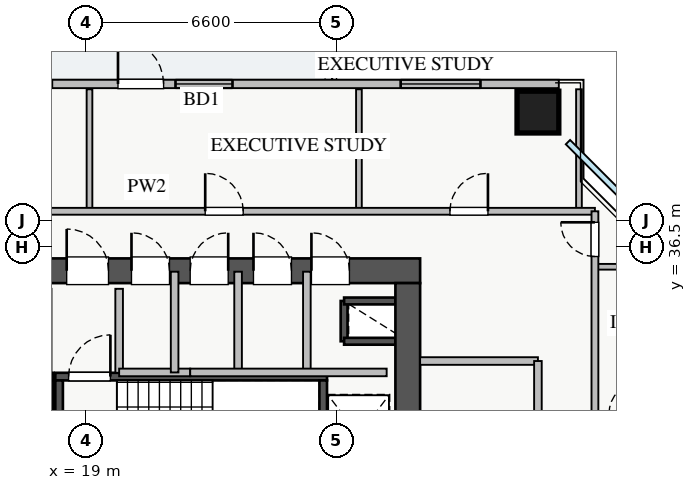
"""IFC4 building model, lengths in metres.
Left out: names, types, materials, properties, quantities, classifications, styles, units other than length and angle.
Written with IfcOpenShell. Run it as: python <this file> out.ifc"""

import sys

from ifc_helpers import new_model, si_unit, direction, frame, frame_2d, origin, origin_2d, place, context, subcontext, project, spatial, rectangle, extrude, source, transform, mapped, element, fill, save


model = new_model("IFC4")
c1 = context("Model", 3, precision=1e-05, world=origin(), true_north=direction((0.0, 1.0)))
c2 = subcontext(c1, "Body", "Model", "MODEL_VIEW")
j1 = project(units=[si_unit("LENGTHUNIT", "METRE"), si_unit("PLANEANGLEUNIT", "RADIAN")], contexts=[c1])
p1 = place(None, origin())
s1 = spatial("IfcSite", under=j1, at=p1, CompositionType="ELEMENT")
p2 = place(p1, origin())
s2 = spatial("IfcBuilding", under=s1, at=p2, CompositionType="ELEMENT")
p3 = place(p2, frame((0.0, 0.0, 103.5)))
s3 = spatial("IfcBuildingStorey", under=s2, at=p3, CompositionType="ELEMENT", Elevation=103.5)
p4 = place(p3, frame((25.8, 34.02, 0.0), z_axis=(0.0, 0.0, 1.0), x_axis=(0.0, 1.0, 0.0)))
e1 = element("IfcWall", 1, at=p4, inside=s3, PredefinedType="SHEAR", context=c2, shape_type="SweptSolid", body=[
    extrude(rectangle(XDim=1.06, YDim=0.18, at=frame_2d((0.53, 0.0))), origin(), (0.0, 0.0, 1.0), 3.07),
])
for number, where, z_axis, x_axis in (
    (2, (25.8, 35.08, 0.0), (0.0, 0.0, 1.0), (1.0, 0.0, 0.0)),
    (3, (25.8, 34.02, 0.0), (0.0, 0.0, 1.0), (1.0, 0.0, 0.0)),
):
    element("IfcWall", number, at=place(p3, frame(where, z_axis=z_axis, x_axis=x_axis)), inside=s3, PredefinedType="SHEAR", context=c2, shape_type="SweptSolid", body=[
        extrude(rectangle(XDim=1.35, YDim=0.18, at=frame_2d((0.675, 0.0))), origin(), (0.0, 0.0, 1.0), 3.07),
    ])
p5 = place(p3, frame((10.85, 33.09, 0.0), z_axis=(0.0, 0.0, 1.0), x_axis=(1.0, 0.0, 0.0)))
e4 = element("IfcWall", 4, at=p5, inside=s3, PredefinedType="SHEAR", context=c2, shape_type="SweptSolid", body=[
    extrude(rectangle(XDim=7.3, YDim=0.2, at=frame_2d((3.65, 0.0))), origin(), (0.0, 0.0, 1.0), 3.25),
])
p6 = place(p5, frame((0.35, 0.0, 0.0)))
e5 = element("IfcOpeningElement", 5, at=p6, cuts=e4, PredefinedType="OPENING", context=c2, shape_type="SweptSolid", body=[
    extrude(rectangle(XDim=1.1, YDim=2.05, at=frame_2d((0.55, 1.025))), frame((0.0, 0.11, 0.0), z_axis=(0.0, -1.0, 0.0), x_axis=(1.0, 0.0, 0.0)), (0.0, 0.0, 1.0), 0.22),
])
p7 = place(p3, frame((18.05, 30.05, 0.0), z_axis=(0.0, 0.0, 1.0), x_axis=(0.0, 1.0, 0.0)))
e6 = element("IfcWall", 6, at=p7, inside=s3, PredefinedType="SHEAR", context=c2, shape_type="SweptSolid", body=[
    extrude(rectangle(XDim=2.94, YDim=0.2, at=frame_2d((1.47, 0.0))), origin(), (0.0, 0.0, 1.0), 3.25),
])
p8 = place(p3, frame((18.2, 33.09, 0.0), z_axis=(0.0, 0.0, 1.0), x_axis=(1.0, 0.0, 0.0)))
e7 = element("IfcWall", 7, at=p8, inside=s3, PredefinedType="SHEAR", context=c2, shape_type="SweptSolid", body=[
    extrude(rectangle(XDim=7.15, YDim=0.2, at=frame_2d((3.575, 0.0))), origin(), (0.0, 0.0, 1.0), 3.25),
])
p9 = place(p8, frame((0.35, 0.0, 0.0)))
e8 = element("IfcOpeningElement", 8, at=p9, cuts=e7, PredefinedType="OPENING", context=c2, shape_type="SweptSolid", body=[
    extrude(rectangle(XDim=1.1, YDim=2.05, at=frame_2d((0.55, 1.025))), frame((0.0, 0.11, 0.0), z_axis=(0.0, -1.0, 0.0), x_axis=(1.0, 0.0, 0.0)), (0.0, 0.0, 1.0), 0.22),
])
for number, where, z_axis, x_axis in (
    (9, (18.3, 30.05, 0.0), (0.0, 0.0, 1.0), (0.0, 1.0, 0.0)),
    (10, (25.25, 30.05, 0.0), (0.0, 0.0, 1.0), (0.0, 1.0, 0.0)),
):
    element("IfcWall", number, at=place(p3, frame(where, z_axis=z_axis, x_axis=x_axis)), inside=s3, PredefinedType="SHEAR", context=c2, shape_type="SweptSolid", body=[
        extrude(rectangle(XDim=2.94, YDim=0.2, at=frame_2d((1.47, 0.0))), origin(), (0.0, 0.0, 1.0), 3.25),
    ])
p10 = place(p3, frame((10.2, 35.875, 0.0), z_axis=(0.0, 0.0, 1.0), x_axis=(1.0, 0.0, 0.0)))
e11 = element("IfcWall", 11, at=p10, inside=s3, PredefinedType="SHEAR", context=c2, shape_type="SweptSolid", body=[
    extrude(rectangle(XDim=17.6, YDim=0.65, at=frame_2d((8.8, 0.0))), origin(), (0.0, 0.0, 1.0), 3.25),
])
p11 = place(p10, frame((1.15, 0.0, 0.0)))
e12 = element("IfcOpeningElement", 12, at=p11, cuts=e11, PredefinedType="OPENING", context=c2, shape_type="SweptSolid", body=[
    extrude(rectangle(XDim=1.1, YDim=2.05, at=frame_2d((0.55, 1.025))), frame((0.0, 0.335, 0.0), z_axis=(0.0, -1.0, 0.0), x_axis=(1.0, 0.0, 0.0)), (0.0, 0.0, 1.0), 0.67),
])
p12 = place(p10, frame((8.3, 0.0, 0.0)))
e13 = element("IfcOpeningElement", 13, at=p12, cuts=e11, PredefinedType="OPENING", context=c2, shape_type="SweptSolid", body=[
    extrude(rectangle(XDim=1.1, YDim=2.05, at=frame_2d((0.55, 1.025))), frame((0.0, 0.335, 0.0), z_axis=(0.0, -1.0, 0.0), x_axis=(1.0, 0.0, 0.0)), (0.0, 0.0, 1.0), 0.67),
])
p13 = place(p10, frame((4.9, 0.0, 0.0)))
e14 = element("IfcOpeningElement", 14, at=p13, cuts=e11, PredefinedType="OPENING", context=c2, shape_type="SweptSolid", body=[
    extrude(rectangle(XDim=1.1, YDim=2.05, at=frame_2d((0.55, 1.025))), frame((0.0, 0.335, 0.0), z_axis=(0.0, -1.0, 0.0), x_axis=(1.0, 0.0, 0.0)), (0.0, 0.0, 1.0), 0.67),
])
p14 = place(p10, frame((14.74, 0.0, 0.0)))
e15 = element("IfcOpeningElement", 15, at=p14, cuts=e11, PredefinedType="OPENING", context=c2, shape_type="SweptSolid", body=[
    extrude(rectangle(XDim=1.0, YDim=2.05, at=frame_2d((0.5, 1.025))), frame((0.0, 0.335, 0.0), z_axis=(0.0, -1.0, 0.0), x_axis=(1.0, 0.0, 0.0)), (0.0, 0.0, 1.0), 0.67),
])
p15 = place(p10, frame((10.005, 0.0, 0.0)))
e16 = element("IfcOpeningElement", 16, at=p15, cuts=e11, PredefinedType="OPENING", context=c2, shape_type="SweptSolid", body=[
    extrude(rectangle(XDim=1.0, YDim=2.05, at=frame_2d((0.5, 1.025))), frame((0.0, 0.335, 0.0), z_axis=(0.0, -1.0, 0.0), x_axis=(1.0, 0.0, 0.0)), (0.0, 0.0, 1.0), 0.67),
])
p16 = place(p10, frame((11.55, 0.0, 0.0)))
e17 = element("IfcOpeningElement", 17, at=p16, cuts=e11, PredefinedType="OPENING", context=c2, shape_type="SweptSolid", body=[
    extrude(rectangle(XDim=1.0, YDim=2.05, at=frame_2d((0.5, 1.025))), frame((0.0, 0.335, 0.0), z_axis=(0.0, -1.0, 0.0), x_axis=(1.0, 0.0, 0.0)), (0.0, 0.0, 1.0), 0.67),
])
p17 = place(p10, frame((13.215, 0.0, 0.0)))
e18 = element("IfcOpeningElement", 18, at=p17, cuts=e11, PredefinedType="OPENING", context=c2, shape_type="SweptSolid", body=[
    extrude(rectangle(XDim=1.0, YDim=2.05, at=frame_2d((0.5, 1.025))), frame((0.0, 0.335, 0.0), z_axis=(0.0, -1.0, 0.0), x_axis=(1.0, 0.0, 0.0)), (0.0, 0.0, 1.0), 0.67),
])
p18 = place(p3, frame((27.475, 29.65, 0.0), z_axis=(0.0, 0.0, 1.0), x_axis=(0.0, 1.0, 0.0)))
e19 = element("IfcWall", 19, at=p18, inside=s3, PredefinedType="SHEAR", context=c2, shape_type="SweptSolid", body=[
    extrude(rectangle(XDim=5.9, YDim=0.65, at=frame_2d((2.95, 0.0))), origin(), (0.0, 0.0, 1.0), 3.25),
])
p19 = place(p18, frame((1.1, 0.0, 0.0)))
e20 = element("IfcOpeningElement", 20, at=p19, cuts=e19, PredefinedType="OPENING", context=c2, shape_type="SweptSolid", body=[
    extrude(rectangle(XDim=1.3, YDim=2.05, at=frame_2d((0.65, 1.025))), frame((0.0, 0.335, 0.0), z_axis=(0.0, -1.0, 0.0), x_axis=(1.0, 0.0, 0.0)), (0.0, 0.0, 1.0), 0.67),
])
m1 = source(origin(), c2, "Body", "SweptSolid", [
    extrude(rectangle(XDim=1.1, YDim=1.1, at=origin_2d()), origin(), (0.0, 0.0, 1.0), 3.25),
])
p20 = place(p3, frame((30.9, 40.05, 0.0), z_axis=(0.0, 0.0, 1.0), x_axis=(1.0, 0.0, 0.0)))
e21 = element("IfcColumn", 21, at=p20, inside=s3, PredefinedType="COLUMN", context=c2, shape_type="MappedRepresentation", body=[
    mapped(m1, transform((0.0, 0.0, 0.0), x_axis=(1.0, 0.0, 0.0), y_axis=(0.0, 1.0, 0.0), z_axis=(0.0, 0.0, 1.0), scale=1.0)),
])
p21 = place(p3, frame((6.55, 40.79, 0.0), z_axis=(0.0, 0.0, 1.0), x_axis=(1.0, 0.0, 0.0)))
e22 = element("IfcWall", 22, at=p21, inside=s3, PredefinedType="STANDARD", context=c2, shape_type="SweptSolid", body=[
    extrude(rectangle(XDim=24.9, YDim=0.22, at=frame_2d((12.45, 0.0))), origin(), (0.0, 0.0, 1.0), 2.61),
])
p22 = place(p21, frame((13.3, 0.0, 0.0)))
e23 = element("IfcOpeningElement", 23, at=p22, cuts=e22, PredefinedType="OPENING", context=c2, shape_type="SweptSolid", body=[
    extrude(rectangle(XDim=1.2, YDim=2.1, at=frame_2d((0.6, 1.05))), frame((0.0, 0.12, 0.0), z_axis=(0.0, -1.0, 0.0), x_axis=(1.0, 0.0, 0.0)), (0.0, 0.0, 1.0), 0.24),
])
p23 = place(p21, frame((0.393, 0.0, 0.9)))
e24 = element("IfcOpeningElement", 24, at=p23, cuts=e22, PredefinedType="OPENING", context=c2, shape_type="SweptSolid", body=[
    extrude(rectangle(XDim=1.5, YDim=1.5, at=frame_2d((0.75, 0.75))), frame((0.0, 0.12, 0.0), z_axis=(0.0, -1.0, 0.0), x_axis=(1.0, 0.0, 0.0)), (0.0, 0.0, 1.0), 0.24),
])
p24 = place(p21, frame((9.76, 0.0, 0.9)))
e25 = element("IfcOpeningElement", 25, at=p24, cuts=e22, PredefinedType="OPENING", context=c2, shape_type="SweptSolid", body=[
    extrude(rectangle(XDim=1.8, YDim=1.5, at=frame_2d((0.9, 0.75))), frame((0.0, 0.12, 0.0), z_axis=(0.0, -1.0, 0.0), x_axis=(1.0, 0.0, 0.0)), (0.0, 0.0, 1.0), 0.24),
])
p25 = place(p21, frame((14.813, 0.0, 0.9)))
e26 = element("IfcOpeningElement", 26, at=p25, cuts=e22, PredefinedType="OPENING", context=c2, shape_type="SweptSolid", body=[
    extrude(rectangle(XDim=1.5, YDim=1.45, at=frame_2d((0.75, 0.725))), frame((0.0, 0.12, 0.0), z_axis=(0.0, -1.0, 0.0), x_axis=(1.0, 0.0, 0.0)), (0.0, 0.0, 1.0), 0.24),
])
p26 = place(p21, frame((20.738, 0.0, 0.9)))
e27 = element("IfcOpeningElement", 27, at=p26, cuts=e22, PredefinedType="OPENING", context=c2, shape_type="SweptSolid", body=[
    extrude(rectangle(XDim=2.1, YDim=1.48, at=frame_2d((1.05, 0.74))), frame((0.0, 0.12, 0.0), z_axis=(0.0, -1.0, 0.0), x_axis=(1.0, 0.0, 0.0)), (0.0, 0.0, 1.0), 0.24),
])
p27 = place(p21, frame((4.171, 0.0, 0.9)))
e28 = element("IfcOpeningElement", 28, at=p27, cuts=e22, PredefinedType="OPENING", context=c2, shape_type="SweptSolid", body=[
    extrude(rectangle(XDim=2.4, YDim=1.5, at=frame_2d((1.2, 0.75))), frame((0.0, 0.12, 0.0), z_axis=(0.0, -1.0, 0.0), x_axis=(1.0, 0.0, 0.0)), (0.0, 0.0, 1.0), 0.24),
])
p28 = place(p3, frame((27.8, 33.5, 0.0), z_axis=(0.0, 0.0, 1.0), x_axis=(1.0, 0.0, 0.0)))
e29 = element("IfcWall", 29, at=p28, inside=s3, PredefinedType="PARTITIONING", context=c2, shape_type="SweptSolid", body=[
    extrude(rectangle(XDim=3.1, YDim=0.2, at=frame_2d((1.55, 0.0))), origin(), (0.0, 0.0, 1.0), 3.07),
])
p29 = place(p3, frame((30.9, 29.6, 0.0), z_axis=(0.0, 0.0, 1.0), x_axis=(0.0, 1.0, 0.0)))
e30 = element("IfcWall", 30, at=p29, inside=s3, PredefinedType="PARTITIONING", context=c2, shape_type="SweptSolid", body=[
    extrude(rectangle(XDim=3.9, YDim=0.2, at=frame_2d((1.95, 0.0))), origin(), (0.0, 0.0, 1.0), 3.07),
])
p30 = place(p29, frame((1.4, 0.0, 0.0)))
e31 = element("IfcOpeningElement", 31, at=p30, cuts=e30, PredefinedType="OPENING", context=c2, shape_type="SweptSolid", body=[
    extrude(rectangle(XDim=1.1, YDim=2.05, at=frame_2d((0.55, 1.025))), frame((0.0, 0.11, 0.0), z_axis=(0.0, -1.0, 0.0), x_axis=(1.0, 0.0, 0.0)), (0.0, 0.0, 1.0), 0.22),
])
p31 = place(p3, frame((19.88, 33.19, 0.0), z_axis=(0.0, 0.0, 1.0), x_axis=(0.0, 1.0, 0.0)))
e32 = element("IfcWall", 32, at=p31, inside=s3, PredefinedType="PARTITIONING", context=c2, shape_type="SweptSolid", body=[
    extrude(rectangle(XDim=2.21, YDim=0.2, at=frame_2d((1.105, 0.0))), origin(), (0.0, 0.0, 1.0), 3.07),
])
p32 = place(p3, frame((24.82, 33.2, 0.0), z_axis=(0.0, 0.0, 1.0), x_axis=(0.0, 1.0, 0.0)))
e33 = element("IfcWall", 33, at=p32, inside=s3, PredefinedType="PARTITIONING", context=c2, shape_type="SweptSolid", body=[
    extrude(rectangle(XDim=2.65, YDim=0.2, at=frame_2d((1.325, 0.0))), origin(), (0.0, 0.0, 1.0), 3.07),
])
p33 = place(p3, frame((19.88, 33.2, 0.0), z_axis=(0.0, 0.0, 1.0), x_axis=(1.0, 0.0, 0.0)))
e34 = element("IfcWall", 34, at=p33, inside=s3, PredefinedType="PARTITIONING", context=c2, shape_type="SweptSolid", body=[
    extrude(rectangle(XDim=1.87, YDim=0.2, at=frame_2d((0.935, 0.0))), origin(), (0.0, 0.0, 1.0), 3.07),
])
for number, where, z_axis, x_axis in (
    (35, (21.34, 33.2, 0.0), (0.0, 0.0, 1.0), (0.0, 1.0, 0.0)),
    (36, (23.01, 33.2, 0.0), (0.0, 0.0, 1.0), (0.0, 1.0, 0.0)),
):
    element("IfcWall", number, at=place(p3, frame(where, z_axis=z_axis, x_axis=x_axis)), inside=s3, PredefinedType="PARTITIONING", context=c2, shape_type="SweptSolid", body=[
        extrude(rectangle(XDim=2.65, YDim=0.2, at=frame_2d((1.325, 0.0))), origin(), (0.0, 0.0, 1.0), 3.07),
    ])
p34 = place(p3, frame((21.75, 33.2, 0.0), z_axis=(0.0, 0.0, 1.0), x_axis=(1.0, 0.0, 0.0)))
e37 = element("IfcWall", 37, at=p34, inside=s3, PredefinedType="PARTITIONING", context=c2, shape_type="SweptSolid", body=[
    extrude(rectangle(XDim=5.17, YDim=0.2, at=frame_2d((2.585, 0.0))), origin(), (0.0, 0.0, 1.0), 3.07),
])
p35 = place(p3, frame((19.1, 37.44, 0.0), z_axis=(0.0, 0.0, 1.0), x_axis=(0.0, 1.0, 0.0)))
e38 = element("IfcWall", 38, at=p35, inside=s3, PredefinedType="PARTITIONING", context=c2, shape_type="SweptSolid", body=[
    extrude(rectangle(XDim=3.21, YDim=0.15, at=frame_2d((1.605, 0.0))), origin(), (0.0, 0.0, 1.0), 2.865),
])
for number, where, z_axis, x_axis in (
    (39, (26.19, 37.44, 0.0), (0.0, 0.0, 1.0), (0.0, 1.0, 0.0)),
    (40, (31.98, 37.44, 0.0), (0.0, 0.0, 1.0), (0.0, 1.0, 0.0)),
):
    element("IfcWall", number, at=place(p3, frame(where, z_axis=z_axis, x_axis=x_axis)), inside=s3, PredefinedType="PARTITIONING", context=c2, shape_type="SweptSolid", body=[
        extrude(rectangle(XDim=3.21, YDim=0.15, at=frame_2d((1.605, 0.0))), origin(), (0.0, 0.0, 1.0), 3.07),
    ])
p36 = place(p3, frame((8.82, 37.44, 0.0), z_axis=(0.0, 0.0, 1.0), x_axis=(1.0, 0.0, 0.0)))
e41 = element("IfcWall", 41, at=p36, inside=s3, PredefinedType="PARTITIONING", context=c2, shape_type="SweptSolid", body=[
    extrude(rectangle(XDim=23.58, YDim=0.18, at=frame_2d((11.79, 0.0))), origin(), (0.0, 0.0, 1.0), 3.07),
])
p37 = place(p36, frame((2.75, 0.0, 0.0)))
e42 = element("IfcOpeningElement", 42, at=p37, cuts=e41, PredefinedType="OPENING", context=c2, shape_type="SweptSolid", body=[
    extrude(rectangle(XDim=1.0, YDim=2.05, at=frame_2d((0.5, 1.025))), frame((0.0, 0.1, 0.0), z_axis=(0.0, -1.0, 0.0), x_axis=(1.0, 0.0, 0.0)), (0.0, 0.0, 1.0), 0.2),
])
p38 = place(p36, frame((7.89, 0.0, 0.0)))
e43 = element("IfcOpeningElement", 43, at=p38, cuts=e41, PredefinedType="OPENING", context=c2, shape_type="SweptSolid", body=[
    extrude(rectangle(XDim=1.0, YDim=2.05, at=frame_2d((0.5, 1.025))), frame((0.0, 0.1, 0.0), z_axis=(0.0, -1.0, 0.0), x_axis=(1.0, 0.0, 0.0)), (0.0, 0.0, 1.0), 0.2),
])
p39 = place(p36, frame((13.325, 0.0, 0.0)))
e44 = element("IfcOpeningElement", 44, at=p39, cuts=e41, PredefinedType="OPENING", context=c2, shape_type="SweptSolid", body=[
    extrude(rectangle(XDim=1.0, YDim=2.05, at=frame_2d((0.5, 1.025))), frame((0.0, 0.1, 0.0), z_axis=(0.0, -1.0, 0.0), x_axis=(1.0, 0.0, 0.0)), (0.0, 0.0, 1.0), 0.2),
])
p40 = place(p36, frame((19.765, 0.0, 0.0)))
e45 = element("IfcOpeningElement", 45, at=p40, cuts=e41, PredefinedType="OPENING", context=c2, shape_type="SweptSolid", body=[
    extrude(rectangle(XDim=1.0, YDim=2.05, at=frame_2d((0.5, 1.025))), frame((0.0, 0.1, 0.0), z_axis=(0.0, -1.0, 0.0), x_axis=(1.0, 0.0, 0.0)), (0.0, 0.0, 1.0), 0.2),
])
p41 = place(p3, frame((32.4, 35.98, 0.0), z_axis=(0.0, 0.0, 1.0), x_axis=(1.0, 0.0, 0.0)))
e46 = element("IfcWall", 46, at=p41, inside=s3, PredefinedType="PARTITIONING", context=c2, shape_type="SweptSolid", body=[
    extrude(rectangle(XDim=4.25, YDim=0.15, at=frame_2d((2.125, 0.0))), origin(), (0.0, 0.0, 1.0), 3.07),
])
p42 = place(p3, frame((32.4, 8.31, 0.0), z_axis=(0.0, 0.0, 1.0), x_axis=(0.0, 1.0, 0.0)))
e47 = element("IfcWall", 47, at=p42, inside=s3, PredefinedType="PARTITIONING", context=c2, shape_type="SweptSolid", body=[
    extrude(rectangle(XDim=29.13, YDim=0.18, at=frame_2d((14.565, 0.0))), origin(), (0.0, 0.0, 1.0), 3.07),
])
p43 = place(p42, frame((27.94, 0.0, 0.0)))
e48 = element("IfcOpeningElement", 48, at=p43, cuts=e47, PredefinedType="OPENING", context=c2, shape_type="SweptSolid", body=[
    extrude(rectangle(XDim=0.9, YDim=2.05, at=frame_2d((0.45, 1.025))), frame((0.0, 0.1, 0.0), z_axis=(0.0, -1.0, 0.0), x_axis=(1.0, 0.0, 0.0)), (0.0, 0.0, 1.0), 0.2),
])
p44 = place(p42, frame((0.415, 0.0, 0.0)))
e49 = element("IfcOpeningElement", 49, at=p44, cuts=e47, PredefinedType="OPENING", context=c2, shape_type="SweptSolid", body=[
    extrude(rectangle(XDim=0.9, YDim=2.05, at=frame_2d((0.45, 1.025))), frame((0.0, 0.1, 0.0), z_axis=(0.0, -1.0, 0.0), x_axis=(1.0, 0.0, 0.0)), (0.0, 0.0, 1.0), 0.2),
])
p45 = place(p42, frame((5.88, 0.0, 0.0)))
e50 = element("IfcOpeningElement", 50, at=p45, cuts=e47, PredefinedType="OPENING", context=c2, shape_type="SweptSolid", body=[
    extrude(rectangle(XDim=1.0, YDim=2.05, at=frame_2d((0.5, 1.025))), frame((0.0, 0.1, 0.0), z_axis=(0.0, -1.0, 0.0), x_axis=(1.0, 0.0, 0.0)), (0.0, 0.0, 1.0), 0.2),
])
p46 = place(p42, frame((12.23, 0.0, 0.0)))
e51 = element("IfcOpeningElement", 51, at=p46, cuts=e47, PredefinedType="OPENING", context=c2, shape_type="SweptSolid", body=[
    extrude(rectangle(XDim=1.0, YDim=2.05, at=frame_2d((0.5, 1.025))), frame((0.0, 0.1, 0.0), z_axis=(0.0, -1.0, 0.0), x_axis=(1.0, 0.0, 0.0)), (0.0, 0.0, 1.0), 0.2),
])
p47 = place(p42, frame((20.835, 0.0, 0.0)))
e52 = element("IfcOpeningElement", 52, at=p47, cuts=e47, PredefinedType="OPENING", context=c2, shape_type="SweptSolid", body=[
    extrude(rectangle(XDim=1.0, YDim=2.05, at=frame_2d((0.5, 1.025))), frame((0.0, 0.1, 0.0), z_axis=(0.0, -1.0, 0.0), x_axis=(1.0, 0.0, 0.0)), (0.0, 0.0, 1.0), 0.2),
])
m2 = source(origin(), c2, "Body", "SweptSolid", [
    extrude(rectangle(XDim=1.2, YDim=2.1, at=frame_2d((0.6, 1.05))), frame((0.0, 0.025, 0.0), z_axis=(0.0, -1.0, 0.0), x_axis=(1.0, 0.0, 0.0)), (0.0, 0.0, 1.0), 0.05),
])
p48 = place(p22, origin())
e53 = element("IfcDoor", 53, at=p48, inside=s3, OperationType="SINGLE_SWING_LEFT", PredefinedType="DOOR", context=c2, shape_type="MappedRepresentation", body=[
    mapped(m2, transform((0.0, 0.0, 0.0), x_axis=(1.0, 0.0, 0.0), y_axis=(0.0, 1.0, 0.0), z_axis=(0.0, 0.0, 1.0), scale=1.0)),
])
fill(e23, e53)
m3 = source(origin(), c2, "Body", "SweptSolid", [
    extrude(rectangle(XDim=1.5, YDim=1.45, at=frame_2d((0.75, 0.725))), frame((0.0, 0.03, 0.0), z_axis=(0.0, -1.0, 0.0), x_axis=(1.0, 0.0, 0.0)), (0.0, 0.0, 1.0), 0.06),
])
p49 = place(p25, origin())
e54 = element("IfcWindow", 54, at=p49, inside=s3, PartitioningType="DOUBLE_PANEL_VERTICAL", PredefinedType="WINDOW", context=c2, shape_type="MappedRepresentation", body=[
    mapped(m3, transform((0.0, 0.0, 0.0), x_axis=(1.0, 0.0, 0.0), y_axis=(0.0, 1.0, 0.0), z_axis=(0.0, 0.0, 1.0), scale=1.0)),
])
fill(e26, e54)
m4 = source(origin(), c2, "Body", "SweptSolid", [
    extrude(rectangle(XDim=2.1, YDim=1.48, at=frame_2d((1.05, 0.74))), frame((0.0, 0.03, 0.0), z_axis=(0.0, -1.0, 0.0), x_axis=(1.0, 0.0, 0.0)), (0.0, 0.0, 1.0), 0.06),
])
p50 = place(p26, origin())
e55 = element("IfcWindow", 55, at=p50, inside=s3, PartitioningType="TRIPLE_PANEL_VERTICAL", PredefinedType="WINDOW", context=c2, shape_type="MappedRepresentation", body=[
    mapped(m4, transform((0.0, 0.0, 0.0), x_axis=(1.0, 0.0, 0.0), y_axis=(0.0, 1.0, 0.0), z_axis=(0.0, 0.0, 1.0), scale=1.0)),
])
fill(e27, e55)
m5 = source(origin(), c2, "Body", "SweptSolid", [
    extrude(rectangle(XDim=1.1, YDim=2.05, at=frame_2d((0.55, 1.025))), frame((0.0, 0.025, 0.0), z_axis=(0.0, -1.0, 0.0), x_axis=(1.0, 0.0, 0.0)), (0.0, 0.0, 1.0), 0.05),
])
p51 = place(p12, origin())
e56 = element("IfcDoor", 56, at=p51, inside=s3, OperationType="SINGLE_SWING_LEFT", PredefinedType="DOOR", context=c2, shape_type="MappedRepresentation", body=[
    mapped(m5, transform((0.0, 0.0, 0.0), x_axis=(1.0, 0.0, 0.0), y_axis=(0.0, 1.0, 0.0), z_axis=(0.0, 0.0, 1.0), scale=1.0)),
])
fill(e13, e56)
p52 = place(p9, origin())
e57 = element("IfcDoor", 57, at=p52, inside=s3, OperationType="SINGLE_SWING_RIGHT", PredefinedType="DOOR", context=c2, shape_type="MappedRepresentation", body=[
    mapped(m5, transform((0.0, 0.0, 0.0), x_axis=(1.0, 0.0, 0.0), y_axis=(0.0, 1.0, 0.0), z_axis=(0.0, 0.0, 1.0), scale=1.0)),
])
fill(e8, e57)
m6 = source(origin(), c2, "Body", "SweptSolid", [
    extrude(rectangle(XDim=1.0, YDim=2.05, at=frame_2d((0.5, 1.025))), frame((0.0, 0.025, 0.0), z_axis=(0.0, -1.0, 0.0), x_axis=(1.0, 0.0, 0.0)), (0.0, 0.0, 1.0), 0.05),
])
p53 = place(p14, origin())
e58 = element("IfcDoor", 58, at=p53, inside=s3, OperationType="SINGLE_SWING_LEFT", PredefinedType="DOOR", context=c2, shape_type="MappedRepresentation", body=[
    mapped(m6, transform((0.0, 0.0, 0.0), x_axis=(1.0, 0.0, 0.0), y_axis=(0.0, 1.0, 0.0), z_axis=(0.0, 0.0, 1.0), scale=1.0)),
])
fill(e15, e58)
p54 = place(p15, origin())
e59 = element("IfcDoor", 59, at=p54, inside=s3, OperationType="SINGLE_SWING_LEFT", PredefinedType="DOOR", context=c2, shape_type="MappedRepresentation", body=[
    mapped(m6, transform((0.0, 0.0, 0.0), x_axis=(1.0, 0.0, 0.0), y_axis=(0.0, 1.0, 0.0), z_axis=(0.0, 0.0, 1.0), scale=1.0)),
])
fill(e16, e59)
p55 = place(p16, origin())
e60 = element("IfcDoor", 60, at=p55, inside=s3, OperationType="SINGLE_SWING_RIGHT", PredefinedType="DOOR", context=c2, shape_type="MappedRepresentation", body=[
    mapped(m6, transform((0.0, 0.0, 0.0), x_axis=(1.0, 0.0, 0.0), y_axis=(0.0, 1.0, 0.0), z_axis=(0.0, 0.0, 1.0), scale=1.0)),
])
fill(e17, e60)
p56 = place(p17, origin())
e61 = element("IfcDoor", 61, at=p56, inside=s3, OperationType="SINGLE_SWING_LEFT", PredefinedType="DOOR", context=c2, shape_type="MappedRepresentation", body=[
    mapped(m6, transform((0.0, 0.0, 0.0), x_axis=(1.0, 0.0, 0.0), y_axis=(0.0, 1.0, 0.0), z_axis=(0.0, 0.0, 1.0), scale=1.0)),
])
fill(e18, e61)
p57 = place(p39, origin())
e62 = element("IfcDoor", 62, at=p57, inside=s3, OperationType="SINGLE_SWING_LEFT", PredefinedType="DOOR", context=c2, shape_type="MappedRepresentation", body=[
    mapped(m6, transform((0.0, 0.0, 0.0), x_axis=(1.0, 0.0, 0.0), y_axis=(0.0, 1.0, 0.0), z_axis=(0.0, 0.0, 1.0), scale=1.0)),
])
fill(e44, e62)
p58 = place(p40, origin())
e63 = element("IfcDoor", 63, at=p58, inside=s3, OperationType="SINGLE_SWING_RIGHT", PredefinedType="DOOR", context=c2, shape_type="MappedRepresentation", body=[
    mapped(m6, transform((0.0, 0.0, 0.0), x_axis=(1.0, 0.0, 0.0), y_axis=(0.0, 1.0, 0.0), z_axis=(0.0, 0.0, 1.0), scale=1.0)),
])
fill(e45, e63)
m7 = source(origin(), c2, "Body", "SweptSolid", [
    extrude(rectangle(XDim=0.9, YDim=2.05, at=frame_2d((0.45, 1.025))), frame((0.0, 0.025, 0.0), z_axis=(0.0, -1.0, 0.0), x_axis=(1.0, 0.0, 0.0)), (0.0, 0.0, 1.0), 0.05),
])
p59 = place(p43, origin())
e64 = element("IfcDoor", 64, at=p59, inside=s3, OperationType="SINGLE_SWING_RIGHT", PredefinedType="DOOR", context=c2, shape_type="MappedRepresentation", body=[
    mapped(m7, transform((0.0, 0.0, 0.0), x_axis=(1.0, 0.0, 0.0), y_axis=(0.0, 1.0, 0.0), z_axis=(0.0, 0.0, 1.0), scale=1.0)),
])
fill(e48, e64)
save(model, sys.argv[1])
